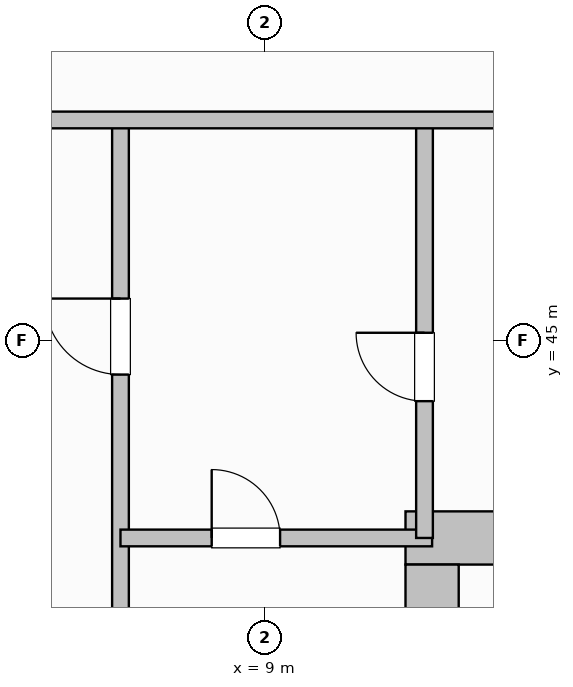
"""IFC4 building model, lengths in metres.
Left out: names, types, materials, properties, quantities, classifications, styles, units other than length and angle.
Written with IfcOpenShell. Run it as: python <this file> out.ifc"""

import sys

from ifc_helpers import new_model, si_unit, direction, frame, frame_2d, origin, origin_2d, place, context, subcontext, project, spatial, rectangle, i_section, extrude, element, fill, save


model = new_model("IFC4")
c1 = context("Model", 3, precision=1e-05, world=origin(), true_north=direction((0.0, 1.0)))
c2 = subcontext(c1, "Body", "Model", "MODEL_VIEW")
j1 = project(units=[si_unit("LENGTHUNIT", "METRE"), si_unit("PLANEANGLEUNIT", "RADIAN")], contexts=[c1])
p1 = place(None, origin())
s1 = spatial("IfcSite", under=j1, at=p1, CompositionType="ELEMENT")
p2 = place(p1, origin())
s2 = spatial("IfcBuilding", under=s1, at=p2, CompositionType="ELEMENT")
p3 = place(p2, origin())
s3 = spatial("IfcBuildingStorey", under=s2, at=p3, CompositionType="ELEMENT", Elevation=0.0)
p4 = place(p3, frame((9.0, 45.0, 0.0), z_axis=(0.0, 0.0, 1.0), x_axis=(1.0, 0.0, 0.0)))
e1 = element("IfcColumn", 1, at=p4, inside=s3, PredefinedType="COLUMN", context=c2, shape_type="SweptSolid", body=[
    extrude(i_section(OverallWidth=0.454, OverallDepth=0.569, WebThickness=0.078, FlangeThickness=0.125, FilletRadius=0.015, at=origin_2d()), origin(), (0.0, 0.0, 1.0), 5.8),
])
p5 = place(p3, frame((24.95, 42.4, 0.0), z_axis=(0.0, 0.0, 1.0), x_axis=(-1.0, 0.0, 0.0)))
e2 = element("IfcWall", 2, at=p5, inside=s3, PredefinedType="SHEAR", context=c2, shape_type="SweptSolid", body=[
    extrude(rectangle(XDim=14.1, YDim=0.7, at=frame_2d((7.05, 0.0))), origin(), (0.0, 0.0, 1.0), 5.48),
])
p6 = place(p5, frame((10.15, 0.0, 0.0)))
e3 = element("IfcOpeningElement", 3, at=p6, cuts=e2, PredefinedType="OPENING", context=c2, shape_type="SweptSolid", body=[
    extrude(rectangle(XDim=1.2, YDim=2.15, at=frame_2d((0.6, 1.075))), frame((0.0, 0.36, 0.0), z_axis=(0.0, -1.0, 0.0), x_axis=(1.0, 0.0, 0.0)), (0.0, 0.0, 1.0), 0.72),
])
p7 = place(p3, frame((11.2, 42.05, 0.0), z_axis=(0.0, 0.0, 1.0), x_axis=(0.0, -1.0, 0.0)))
e4 = element("IfcWall", 4, at=p7, inside=s3, PredefinedType="SHEAR", context=c2, shape_type="SweptSolid", body=[
    extrude(rectangle(XDim=13.5, YDim=0.7, at=frame_2d((6.75, 0.0))), origin(), (0.0, 0.0, 1.0), 5.48),
])
p8 = place(p7, frame((2.95, 0.0, 0.0)))
e5 = element("IfcOpeningElement", 5, at=p8, cuts=e4, PredefinedType="OPENING", context=c2, shape_type="SweptSolid", body=[
    extrude(rectangle(XDim=1.35, YDim=2.15, at=frame_2d((0.675, 1.075))), frame((0.0, 0.36, 0.0), z_axis=(0.0, -1.0, 0.0), x_axis=(1.0, 0.0, 0.0)), (0.0, 0.0, 1.0), 0.72),
])
p9 = place(p3, frame((7.1, 39.35, 0.0), z_axis=(0.0, 0.0, 1.0), x_axis=(0.0, 1.0, 0.0)))
e6 = element("IfcWall", 6, at=p9, inside=s3, PredefinedType="PARTITIONING", context=c2, shape_type="SweptSolid", body=[
    extrude(rectangle(XDim=8.55, YDim=0.22, at=frame_2d((4.275, 0.0))), origin(), (0.0, 0.0, 1.0), 4.533),
])
p10 = place(p9, frame((5.2, 0.0, 0.0)))
e7 = element("IfcOpeningElement", 7, at=p10, cuts=e6, PredefinedType="OPENING", context=c2, shape_type="SweptSolid", body=[
    extrude(rectangle(XDim=1.0, YDim=2.15, at=frame_2d((0.5, 1.075))), frame((0.0, 0.12, 0.0), z_axis=(0.0, -1.0, 0.0), x_axis=(1.0, 0.0, 0.0)), (0.0, 0.0, 1.0), 0.24),
])
p11 = place(p3, frame((7.1, 42.4, 0.0), z_axis=(0.0, 0.0, 1.0), x_axis=(1.0, 0.0, 0.0)))
e8 = element("IfcWall", 8, at=p11, inside=s3, PredefinedType="PARTITIONING", context=c2, shape_type="SweptSolid", body=[
    extrude(rectangle(XDim=4.1, YDim=0.22, at=frame_2d((2.05, 0.0))), origin(), (0.0, 0.0, 1.0), 4.605),
])
p12 = place(p11, frame((1.2, 0.0, 0.0)))
e9 = element("IfcOpeningElement", 9, at=p12, cuts=e8, PredefinedType="OPENING", context=c2, shape_type="SweptSolid", body=[
    extrude(rectangle(XDim=0.9, YDim=2.1, at=frame_2d((0.45, 1.05))), frame((0.0, 0.12, 0.0), z_axis=(0.0, -1.0, 0.0), x_axis=(1.0, 0.0, 0.0)), (0.0, 0.0, 1.0), 0.24),
])
p13 = place(p3, frame((11.1, 42.4, 0.0), z_axis=(0.0, 0.0, 1.0), x_axis=(0.0, 1.0, 0.0)))
e10 = element("IfcWall", 10, at=p13, inside=s3, PredefinedType="PARTITIONING", context=c2, shape_type="SweptSolid", body=[
    extrude(rectangle(XDim=5.5, YDim=0.22, at=frame_2d((2.75, 0.0))), origin(), (0.0, 0.0, 1.0), 4.533),
])
p14 = place(p13, frame((1.8, 0.0, 0.0)))
e11 = element("IfcOpeningElement", 11, at=p14, cuts=e10, PredefinedType="OPENING", context=c2, shape_type="SweptSolid", body=[
    extrude(rectangle(XDim=0.9, YDim=2.1, at=frame_2d((0.45, 1.05))), frame((0.0, 0.12, 0.0), z_axis=(0.0, -1.0, 0.0), x_axis=(1.0, 0.0, 0.0)), (0.0, 0.0, 1.0), 0.24),
])
p15 = place(p3, frame((0.0, 47.9, 0.0), z_axis=(0.0, 0.0, 1.0), x_axis=(1.0, 0.0, 0.0)))
e12 = element("IfcWall", 12, at=p15, inside=s3, PredefinedType="PARTITIONING", context=c2, shape_type="SweptSolid", body=[
    extrude(rectangle(XDim=27.1, YDim=0.22, at=frame_2d((13.55, 0.0))), origin(), (0.0, 0.0, 1.0), 4.605),
])
p16 = place(p15, frame((13.5, 0.0, 0.0)))
e13 = element("IfcOpeningElement", 13, at=p16, cuts=e12, PredefinedType="OPENING", context=c2, shape_type="SweptSolid", body=[
    extrude(rectangle(XDim=1.1, YDim=2.15, at=frame_2d((0.55, 1.075))), frame((0.0, 0.12, 0.0), z_axis=(0.0, -1.0, 0.0), x_axis=(1.0, 0.0, 0.0)), (0.0, 0.0, 1.0), 0.24),
])
p17 = place(p15, frame((3.0, 0.0, 0.0)))
e14 = element("IfcOpeningElement", 14, at=p17, cuts=e12, PredefinedType="OPENING", context=c2, shape_type="SweptSolid", body=[
    extrude(rectangle(XDim=1.0, YDim=2.15, at=frame_2d((0.5, 1.075))), frame((0.0, 0.12, 0.0), z_axis=(0.0, -1.0, 0.0), x_axis=(1.0, 0.0, 0.0)), (0.0, 0.0, 1.0), 0.24),
])
p18 = place(p10, origin())
e15 = element("IfcDoor", 15, at=p18, inside=s3, OperationType="SINGLE_SWING_RIGHT", PredefinedType="DOOR", context=c2, shape_type="SweptSolid", body=[
    extrude(rectangle(XDim=1.0, YDim=2.15, at=frame_2d((0.5, 1.075))), frame((0.0, 0.025, 0.0), z_axis=(0.0, -1.0, 0.0), x_axis=(1.0, 0.0, 0.0)), (0.0, 0.0, 1.0), 0.05),
])
fill(e7, e15)
p19 = place(p12, origin())
e16 = element("IfcDoor", 16, at=p19, inside=s3, OperationType="SINGLE_SWING_LEFT", PredefinedType="DOOR", context=c2, shape_type="SweptSolid", body=[
    extrude(rectangle(XDim=0.9, YDim=2.1, at=frame_2d((0.45, 1.05))), frame((0.0, 0.025, 0.0), z_axis=(0.0, -1.0, 0.0), x_axis=(1.0, 0.0, 0.0)), (0.0, 0.0, 1.0), 0.05),
])
fill(e9, e16)
p20 = place(p14, origin())
e17 = element("IfcDoor", 17, at=p20, inside=s3, OperationType="SINGLE_SWING_RIGHT", PredefinedType="DOOR", context=c2, shape_type="SweptSolid", body=[
    extrude(rectangle(XDim=0.9, YDim=2.1, at=frame_2d((0.45, 1.05))), frame((0.0, 0.025, 0.0), z_axis=(0.0, -1.0, 0.0), x_axis=(1.0, 0.0, 0.0)), (0.0, 0.0, 1.0), 0.05),
])
fill(e11, e17)
save(model, sys.argv[1])
